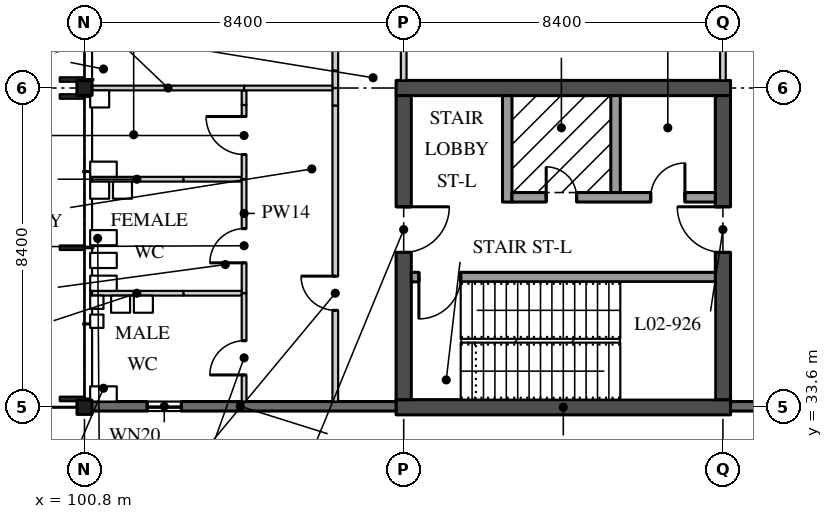
"""IFC4 building model, lengths in metres.
Left out: names, types, materials, properties, quantities, classifications, styles, units other than length and angle.
Written with IfcOpenShell. Run it as: python <this file> out.ifc"""

import sys

from ifc_helpers import new_model, si_unit, direction, frame, frame_2d, origin, origin_2d, place, context, subcontext, project, spatial, rectangle, i_section, extrude, element, fill, save


model = new_model("IFC4")
c1 = context("Model", 3, precision=1e-05, world=origin(), true_north=direction((0.0, 1.0)))
c2 = subcontext(c1, "Body", "Model", "MODEL_VIEW")
j1 = project(units=[si_unit("LENGTHUNIT", "METRE"), si_unit("PLANEANGLEUNIT", "RADIAN")], contexts=[c1])
p1 = place(None, origin())
s1 = spatial("IfcSite", under=j1, at=p1, CompositionType="ELEMENT")
p2 = place(p1, origin())
s2 = spatial("IfcBuilding", under=s1, at=p2, CompositionType="ELEMENT")
p3 = place(p2, frame((0.0, 0.0, 9.9)))
s3 = spatial("IfcBuildingStorey", under=s2, at=p3, CompositionType="ELEMENT", Elevation=9.9)
p4 = place(p3, frame((100.8, 33.6, 0.0), z_axis=(0.0, 0.0, 1.0), x_axis=(1.0, 0.0, 0.0)))
e1 = element("IfcColumn", 1, at=p4, inside=s3, PredefinedType="COLUMN", context=c2, shape_type="SweptSolid", body=[
    extrude(i_section(OverallWidth=0.394, OverallDepth=0.376, WebThickness=0.017, FlangeThickness=0.028, FilletRadius=0.015, at=origin_2d()), origin(), (0.0, 0.0, 1.0), 4.37),
])
p5 = place(p3, frame((100.8, 42.0, 0.0), z_axis=(0.0, 0.0, 1.0), x_axis=(1.0, 0.0, 0.0)))
e2 = element("IfcColumn", 2, at=p5, inside=s3, PredefinedType="COLUMN", context=c2, shape_type="SweptSolid", body=[
    extrude(i_section(OverallWidth=0.399, OverallDepth=0.386, WebThickness=0.021, FlangeThickness=0.033, FilletRadius=0.015, at=origin_2d()), origin(), (0.0, 0.0, 1.0), 4.37),
])
for number, where, z_axis, x_axis in (
    (3, (109.0, 33.6, 0.0), (0.0, 0.0, 1.0), (1.0, 0.0, 0.0)),
    (4, (109.0, 42.0, 0.0), (0.0, 0.0, 1.0), (1.0, 0.0, 0.0)),
):
    element("IfcWall", number, at=place(p3, frame(where, z_axis=z_axis, x_axis=x_axis)), inside=s3, PredefinedType="SHEAR", context=c2, shape_type="SweptSolid", body=[
        extrude(rectangle(XDim=8.8, YDim=0.4, at=frame_2d((4.4, 0.0))), origin(), (0.0, 0.0, 1.0), 4.37),
    ])
p6 = place(p3, frame((109.2, 33.8, 0.0), z_axis=(0.0, 0.0, 1.0), x_axis=(0.0, 1.0, 0.0)))
e5 = element("IfcWall", 5, at=p6, inside=s3, PredefinedType="SHEAR", context=c2, shape_type="SweptSolid", body=[
    extrude(rectangle(XDim=8.0, YDim=0.4, at=frame_2d((4.0, 0.0))), origin(), (0.0, 0.0, 1.0), 4.37),
])
p7 = place(p6, frame((3.875, 0.0, 0.0)))
e6 = element("IfcOpeningElement", 6, at=p7, cuts=e5, PredefinedType="OPENING", context=c2, shape_type="SweptSolid", body=[
    extrude(rectangle(XDim=1.2, YDim=2.1, at=frame_2d((0.6, 1.05))), frame((0.0, 0.21, 0.0), z_axis=(0.0, -1.0, 0.0), x_axis=(1.0, 0.0, 0.0)), (0.0, 0.0, 1.0), 0.42),
])
p8 = place(p3, frame((117.6, 33.8, 0.0), z_axis=(0.0, 0.0, 1.0), x_axis=(0.0, 1.0, 0.0)))
e7 = element("IfcWall", 7, at=p8, inside=s3, PredefinedType="SHEAR", context=c2, shape_type="SweptSolid", body=[
    extrude(rectangle(XDim=8.0, YDim=0.4, at=frame_2d((4.0, 0.0))), origin(), (0.0, 0.0, 1.0), 4.37),
])
p9 = place(p8, frame((3.875, 0.0, 0.0)))
e8 = element("IfcOpeningElement", 8, at=p9, cuts=e7, PredefinedType="OPENING", context=c2, shape_type="SweptSolid", body=[
    extrude(rectangle(XDim=1.2, YDim=2.1, at=frame_2d((0.6, 1.05))), frame((0.0, 0.21, 0.0), z_axis=(0.0, -1.0, 0.0), x_axis=(1.0, 0.0, 0.0)), (0.0, 0.0, 1.0), 0.42),
])
p10 = place(p3, frame((109.4, 37.025, 0.0), z_axis=(0.0, 0.0, 1.0), x_axis=(1.0, 0.0, 0.0)))
e9 = element("IfcWall", 9, at=p10, inside=s3, PredefinedType="SOLIDWALL", context=c2, shape_type="SweptSolid", body=[
    extrude(rectangle(XDim=8.0, YDim=0.25, at=frame_2d((4.0, 0.0))), origin(), (0.0, 0.0, 1.0), 4.37),
])
p11 = place(p10, frame((0.2, 0.0, 0.0)))
e10 = element("IfcOpeningElement", 10, at=p11, cuts=e9, PredefinedType="OPENING", context=c2, shape_type="SweptSolid", body=[
    extrude(rectangle(XDim=1.1, YDim=2.1, at=frame_2d((0.55, 1.05))), frame((0.0, 0.135, 0.0), z_axis=(0.0, -1.0, 0.0), x_axis=(1.0, 0.0, 0.0)), (0.0, 0.0, 1.0), 0.27),
])
p12 = place(p3, frame((111.925, 39.0, 0.0), z_axis=(0.0, 0.0, 1.0), x_axis=(0.0, 1.0, 0.0)))
e11 = element("IfcWall", 11, at=p12, inside=s3, PredefinedType="SOLIDWALL", context=c2, shape_type="SweptSolid", body=[
    extrude(rectangle(XDim=2.8, YDim=0.25, at=frame_2d((1.4, 0.0))), origin(), (0.0, 0.0, 1.0), 4.37),
])
p13 = place(p3, frame((112.05, 39.125, 0.0), z_axis=(0.0, 0.0, 1.0), x_axis=(1.0, 0.0, 0.0)))
e12 = element("IfcWall", 12, at=p13, inside=s3, PredefinedType="SOLIDWALL", context=c2, shape_type="SweptSolid", body=[
    extrude(rectangle(XDim=5.35, YDim=0.25, at=frame_2d((2.675, 0.0))), origin(), (0.0, 0.0, 1.0), 4.37),
])
p14 = place(p13, frame((3.65, 0.0, 0.0)))
e13 = element("IfcOpeningElement", 13, at=p14, cuts=e12, PredefinedType="OPENING", context=c2, shape_type="SweptSolid", body=[
    extrude(rectangle(XDim=0.9, YDim=2.1, at=frame_2d((0.45, 1.05))), frame((0.0, 0.135, 0.0), z_axis=(0.0, -1.0, 0.0), x_axis=(1.0, 0.0, 0.0)), (0.0, 0.0, 1.0), 0.27),
])
p15 = place(p13, frame((0.9, 0.0, 0.0)))
e14 = element("IfcOpeningElement", 14, at=p15, cuts=e12, PredefinedType="OPENING", context=c2, shape_type="SweptSolid", body=[
    extrude(rectangle(XDim=0.8, YDim=2.1, at=frame_2d((0.4, 1.05))), frame((0.0, 0.135, 0.0), z_axis=(0.0, -1.0, 0.0), x_axis=(1.0, 0.0, 0.0)), (0.0, 0.0, 1.0), 0.27),
])
p16 = place(p3, frame((114.775, 39.25, 0.0), z_axis=(0.0, 0.0, 1.0), x_axis=(0.0, 1.0, 0.0)))
e15 = element("IfcWall", 15, at=p16, inside=s3, PredefinedType="SOLIDWALL", context=c2, shape_type="SweptSolid", body=[
    extrude(rectangle(XDim=2.55, YDim=0.25, at=frame_2d((1.275, 0.0))), origin(), (0.0, 0.0, 1.0), 4.37),
])
p17 = place(p3, frame((117.6, 42.2, 0.0), z_axis=(0.0, 0.0, 1.0), x_axis=(0.0, 1.0, 0.0)))
e16 = element("IfcWall", 16, at=p17, inside=s3, PredefinedType="PARTITIONING", context=c2, shape_type="SweptSolid", body=[
    extrude(rectangle(XDim=8.0, YDim=0.15, at=frame_2d((4.0, 0.0))), origin(), (0.0, 0.0, 1.0), 3.746),
])
p18 = place(p17, frame((3.55, 0.0, 0.0)))
e17 = element("IfcOpeningElement", 17, at=p18, cuts=e16, PredefinedType="OPENING", context=c2, shape_type="SweptSolid", body=[
    extrude(rectangle(XDim=0.9, YDim=2.1, at=frame_2d((0.45, 1.05))), frame((0.0, 0.085, 0.0), z_axis=(0.0, -1.0, 0.0), x_axis=(1.0, 0.0, 0.0)), (0.0, 0.0, 1.0), 0.17),
])
p19 = place(p3, frame((109.2, 42.2, 0.0), z_axis=(0.0, 0.0, 1.0), x_axis=(0.0, 1.0, 0.0)))
e18 = element("IfcWall", 18, at=p19, inside=s3, PredefinedType="PARTITIONING", context=c2, shape_type="SweptSolid", body=[
    extrude(rectangle(XDim=8.0, YDim=0.15, at=frame_2d((4.0, 0.0))), origin(), (0.0, 0.0, 1.0), 3.746),
])
p20 = place(p19, frame((3.55, 0.0, 0.0)))
e19 = element("IfcOpeningElement", 19, at=p20, cuts=e18, PredefinedType="OPENING", context=c2, shape_type="SweptSolid", body=[
    extrude(rectangle(XDim=0.9, YDim=2.1, at=frame_2d((0.45, 1.05))), frame((0.0, 0.085, 0.0), z_axis=(0.0, -1.0, 0.0), x_axis=(1.0, 0.0, 0.0)), (0.0, 0.0, 1.0), 0.17),
])
p21 = place(p3, frame((107.4, 33.75, 0.0), z_axis=(0.0, 0.0, 1.0), x_axis=(0.0, 1.0, 0.0)))
e20 = element("IfcWall", 20, at=p21, inside=s3, PredefinedType="PARTITIONING", context=c2, shape_type="SweptSolid", body=[
    extrude(rectangle(XDim=7.79, YDim=0.15, at=frame_2d((3.895, 0.0))), origin(), (0.0, 0.0, 1.0), 4.37),
])
p22 = place(p21, frame((2.4, 0.0, 0.0)))
e21 = element("IfcOpeningElement", 21, at=p22, cuts=e20, PredefinedType="OPENING", context=c2, shape_type="SweptSolid", body=[
    extrude(rectangle(XDim=0.9, YDim=2.1, at=frame_2d((0.45, 1.05))), frame((0.0, 0.085, 0.0), z_axis=(0.0, -1.0, 0.0), x_axis=(1.0, 0.0, 0.0)), (0.0, 0.0, 1.0), 0.17),
])
for number, where, z_axis, x_axis in (
    (22, (107.4, 41.54, 0.0), (0.0, 0.0, 1.0), (0.0, 1.0, 0.0)),
    (23, (107.4, 42.0, 0.0), (0.0, 0.0, 1.0), (0.0, 1.0, 0.0)),
):
    element("IfcWall", number, at=place(p3, frame(where, z_axis=z_axis, x_axis=x_axis)), inside=s3, PredefinedType="PARTITIONING", context=c2, shape_type="SweptSolid", body=[
        extrude(rectangle(XDim=0.46, YDim=0.15, at=frame_2d((0.23, 0.0))), origin(), (0.0, 0.0, 1.0), 3.746),
    ])
p23 = place(p3, frame((107.4, 42.46, 0.0), z_axis=(0.0, 0.0, 1.0), x_axis=(0.0, 1.0, 0.0)))
e24 = element("IfcWall", 24, at=p23, inside=s3, PredefinedType="PARTITIONING", context=c2, shape_type="SweptSolid", body=[
    extrude(rectangle(XDim=7.71, YDim=0.15, at=frame_2d((3.855, 0.0))), origin(), (0.0, 0.0, 1.0), 4.37),
])
p24 = place(p3, frame((100.95, 39.6, 0.0), z_axis=(0.0, 0.0, 1.0), x_axis=(1.0, 0.0, 0.0)))
e25 = element("IfcWall", 25, at=p24, inside=s3, PredefinedType="PARTITIONING", context=c2, shape_type="SweptSolid", body=[
    extrude(rectangle(XDim=2.457, YDim=0.125, at=frame_2d((1.229, 0.0))), origin(), (0.0, 0.0, 1.0), 4.37),
])
p25 = place(p3, frame((103.407, 39.6, 0.0), z_axis=(0.0, 0.0, 1.0), x_axis=(1.0, 0.0, 0.0)))
e26 = element("IfcWall", 26, at=p25, inside=s3, PredefinedType="PARTITIONING", context=c2, shape_type="SweptSolid", body=[
    extrude(rectangle(XDim=1.531, YDim=0.125, at=frame_2d((0.766, 0.0))), origin(), (0.0, 0.0, 1.0), 3.895),
])
p26 = place(p3, frame((105.0, 39.6, 0.0), z_axis=(0.0, 0.0, 1.0), x_axis=(0.0, 1.0, 0.0)))
e27 = element("IfcWall", 27, at=p26, inside=s3, PredefinedType="PARTITIONING", context=c2, shape_type="SweptSolid", body=[
    extrude(rectangle(XDim=1.953, YDim=0.125, at=frame_2d((0.977, 0.0))), origin(), (0.0, 0.0, 1.0), 4.37),
])
p27 = place(p26, frame((0.65, 0.0, 0.0)))
e28 = element("IfcOpeningElement", 28, at=p27, cuts=e27, PredefinedType="OPENING", context=c2, shape_type="SweptSolid", body=[
    extrude(rectangle(XDim=1.0, YDim=2.1, at=frame_2d((0.5, 1.05))), frame((0.0, 0.073, 0.0), z_axis=(0.0, -1.0, 0.0), x_axis=(1.0, 0.0, 0.0)), (0.0, 0.0, 1.0), 0.145),
])
p28 = place(p3, frame((105.0, 41.553, 0.0), z_axis=(0.0, 0.0, 1.0), x_axis=(0.0, 1.0, 0.0)))
e29 = element("IfcWall", 29, at=p28, inside=s3, PredefinedType="PARTITIONING", context=c2, shape_type="SweptSolid", body=[
    extrude(rectangle(XDim=0.385, YDim=0.125, at=frame_2d((0.192, 0.0))), origin(), (0.0, 0.0, 1.0), 3.746),
])
p29 = place(p3, frame((100.999, 42.0, 0.0), z_axis=(0.0, 0.0, 1.0), x_axis=(1.0, 0.0, 0.0)))
e30 = element("IfcWall", 30, at=p29, inside=s3, PredefinedType="PARTITIONING", context=c2, shape_type="SweptSolid", body=[
    extrude(rectangle(XDim=4.001, YDim=0.125, at=frame_2d((2.0, 0.0))), origin(), (0.0, 0.0, 1.0), 3.746),
])
p30 = place(p3, frame((105.0, 36.6, 0.0), z_axis=(0.0, 0.0, 1.0), x_axis=(0.0, 1.0, 0.0)))
e31 = element("IfcWall", 31, at=p30, inside=s3, PredefinedType="PARTITIONING", context=c2, shape_type="SweptSolid", body=[
    extrude(rectangle(XDim=3.0, YDim=0.125, at=frame_2d((1.5, 0.0))), origin(), (0.0, 0.0, 1.0), 4.37),
])
p31 = place(p30, frame((0.8, 0.0, 0.0)))
e32 = element("IfcOpeningElement", 32, at=p31, cuts=e31, PredefinedType="OPENING", context=c2, shape_type="SweptSolid", body=[
    extrude(rectangle(XDim=0.9, YDim=2.1, at=frame_2d((0.45, 1.05))), frame((0.0, 0.073, 0.0), z_axis=(0.0, -1.0, 0.0), x_axis=(1.0, 0.0, 0.0)), (0.0, 0.0, 1.0), 0.145),
])
p32 = place(p3, frame((100.95, 36.6, 0.0), z_axis=(0.0, 0.0, 1.0), x_axis=(1.0, 0.0, 0.0)))
e33 = element("IfcWall", 33, at=p32, inside=s3, PredefinedType="PARTITIONING", context=c2, shape_type="SweptSolid", body=[
    extrude(rectangle(XDim=2.457, YDim=0.125, at=frame_2d((1.229, 0.0))), origin(), (0.0, 0.0, 1.0), 4.37),
])
p33 = place(p3, frame((103.407, 36.6, 0.0), z_axis=(0.0, 0.0, 1.0), x_axis=(1.0, 0.0, 0.0)))
e34 = element("IfcWall", 34, at=p33, inside=s3, PredefinedType="PARTITIONING", context=c2, shape_type="SweptSolid", body=[
    extrude(rectangle(XDim=1.531, YDim=0.125, at=frame_2d((0.766, 0.0))), origin(), (0.0, 0.0, 1.0), 3.895),
])
p34 = place(p3, frame((105.0, 33.75, 0.0), z_axis=(0.0, 0.0, 1.0), x_axis=(0.0, 1.0, 0.0)))
e35 = element("IfcWall", 35, at=p34, inside=s3, PredefinedType="PARTITIONING", context=c2, shape_type="SweptSolid", body=[
    extrude(rectangle(XDim=2.85, YDim=0.125, at=frame_2d((1.425, 0.0))), origin(), (0.0, 0.0, 1.0), 4.37),
])
p35 = place(p34, frame((0.7, 0.0, 0.0)))
e36 = element("IfcOpeningElement", 36, at=p35, cuts=e35, PredefinedType="OPENING", context=c2, shape_type="SweptSolid", body=[
    extrude(rectangle(XDim=0.9, YDim=2.1, at=frame_2d((0.45, 1.05))), frame((0.0, 0.073, 0.0), z_axis=(0.0, -1.0, 0.0), x_axis=(1.0, 0.0, 0.0)), (0.0, 0.0, 1.0), 0.145),
])
p36 = place(p3, frame((105.0, 42.0, 0.0), z_axis=(0.0, 0.0, 1.0), x_axis=(1.0, 0.0, 0.0)))
e37 = element("IfcWall", 37, at=p36, inside=s3, PredefinedType="PARTITIONING", context=c2, shape_type="SweptSolid", body=[
    extrude(rectangle(XDim=2.325, YDim=0.125, at=frame_2d((1.163, 0.0))), origin(), (0.0, 0.0, 1.0), 3.746),
])
p37 = place(p3, frame((100.802, 33.625, 0.0), z_axis=(0.0, 0.0, 1.0), x_axis=(1.0, 0.0, 0.0)))
e38 = element("IfcWall", 38, at=p37, inside=s3, PredefinedType="SOLIDWALL", context=c2, shape_type="SweptSolid", body=[
    extrude(rectangle(XDim=8.198, YDim=0.25, at=frame_2d((4.099, 0.0))), origin(), (0.0, 0.0, 1.0), 3.746),
])
p38 = place(p37, frame((1.649, 0.0, 1.5)))
e39 = element("IfcOpeningElement", 39, at=p38, cuts=e38, PredefinedType="OPENING", context=c2, shape_type="SweptSolid", body=[
    extrude(rectangle(XDim=0.9, YDim=1.2, at=frame_2d((0.45, 0.6))), frame((0.0, 0.135, 0.0), z_axis=(0.0, -1.0, 0.0), x_axis=(1.0, 0.0, 0.0)), (0.0, 0.0, 1.0), 0.27),
])
p39 = place(p3, frame((117.8, 33.625, 0.0), z_axis=(0.0, 0.0, 1.0), x_axis=(1.0, 0.0, 0.0)))
e40 = element("IfcWall", 40, at=p39, inside=s3, PredefinedType="SOLIDWALL", context=c2, shape_type="SweptSolid", body=[
    extrude(rectangle(XDim=8.194, YDim=0.25, at=frame_2d((4.097, 0.0))), origin(), (0.0, 0.0, 1.0), 3.746),
])
p40 = place(p39, frame((5.2, 0.0, 0.9)))
e41 = element("IfcOpeningElement", 41, at=p40, cuts=e40, PredefinedType="OPENING", context=c2, shape_type="SweptSolid", body=[
    extrude(rectangle(XDim=1.8, YDim=2.1, at=frame_2d((0.9, 1.05))), frame((0.0, 0.135, 0.0), z_axis=(0.0, -1.0, 0.0), x_axis=(1.0, 0.0, 0.0)), (0.0, 0.0, 1.0), 0.27),
])
p41 = place(p14, origin())
e42 = element("IfcDoor", 42, at=p41, inside=s3, OperationType="SINGLE_SWING_LEFT", PredefinedType="DOOR", context=c2, shape_type="SweptSolid", body=[
    extrude(rectangle(XDim=0.9, YDim=2.1, at=frame_2d((0.45, 1.05))), frame((0.0, 0.035, 0.0), z_axis=(0.0, -1.0, 0.0), x_axis=(1.0, 0.0, 0.0)), (0.0, 0.0, 1.0), 0.07),
])
fill(e13, e42)
p42 = place(p7, frame((1.2, 0.0, 0.0), z_axis=(0.0, 0.0, 1.0), x_axis=(-1.0, 0.0, 0.0)))
e43 = element("IfcDoor", 43, at=p42, inside=s3, OperationType="SINGLE_SWING_RIGHT", PredefinedType="DOOR", context=c2, shape_type="SweptSolid", body=[
    extrude(rectangle(XDim=1.2, YDim=2.1, at=frame_2d((0.6, 1.05))), frame((0.0, 0.035, 0.0), z_axis=(0.0, -1.0, 0.0), x_axis=(1.0, 0.0, 0.0)), (0.0, 0.0, 1.0), 0.07),
])
fill(e6, e43)
p43 = place(p9, origin())
e44 = element("IfcDoor", 44, at=p43, inside=s3, OperationType="SINGLE_SWING_LEFT", PredefinedType="DOOR", context=c2, shape_type="SweptSolid", body=[
    extrude(rectangle(XDim=1.2, YDim=2.1, at=frame_2d((0.6, 1.05))), frame((0.0, 0.035, 0.0), z_axis=(0.0, -1.0, 0.0), x_axis=(1.0, 0.0, 0.0)), (0.0, 0.0, 1.0), 0.07),
])
fill(e8, e44)
p44 = place(p15, origin())
e45 = element("IfcDoor", 45, at=p44, inside=s3, OperationType="SINGLE_SWING_RIGHT", PredefinedType="DOOR", context=c2, shape_type="SweptSolid", body=[
    extrude(rectangle(XDim=0.8, YDim=2.1, at=frame_2d((0.4, 1.05))), frame((0.0, 0.035, 0.0), z_axis=(0.0, -1.0, 0.0), x_axis=(1.0, 0.0, 0.0)), (0.0, 0.0, 1.0), 0.07),
])
fill(e14, e45)
p45 = place(p11, frame((1.1, 0.0, 0.0), z_axis=(0.0, 0.0, 1.0), x_axis=(-1.0, 0.0, 0.0)))
e46 = element("IfcDoor", 46, at=p45, inside=s3, OperationType="SINGLE_SWING_LEFT", PredefinedType="DOOR", context=c2, shape_type="SweptSolid", body=[
    extrude(rectangle(XDim=1.1, YDim=2.1, at=frame_2d((0.55, 1.05))), frame((0.0, 0.035, 0.0), z_axis=(0.0, -1.0, 0.0), x_axis=(1.0, 0.0, 0.0)), (0.0, 0.0, 1.0), 0.07),
])
fill(e10, e46)
p46 = place(p27, origin())
e47 = element("IfcDoor", 47, at=p46, inside=s3, OperationType="SINGLE_SWING_LEFT", PredefinedType="DOOR", context=c2, shape_type="SweptSolid", body=[
    extrude(rectangle(XDim=1.0, YDim=2.1, at=frame_2d((0.5, 1.05))), frame((0.0, 0.02, 0.0), z_axis=(0.0, -1.0, 0.0), x_axis=(1.0, 0.0, 0.0)), (0.0, 0.0, 1.0), 0.04),
])
fill(e28, e47)
p47 = place(p31, origin())
e48 = element("IfcDoor", 48, at=p47, inside=s3, OperationType="SINGLE_SWING_RIGHT", PredefinedType="DOOR", context=c2, shape_type="SweptSolid", body=[
    extrude(rectangle(XDim=0.9, YDim=2.1, at=frame_2d((0.45, 1.05))), frame((0.0, 0.02, 0.0), z_axis=(0.0, -1.0, 0.0), x_axis=(1.0, 0.0, 0.0)), (0.0, 0.0, 1.0), 0.04),
])
fill(e32, e48)
p48 = place(p22, origin())
e49 = element("IfcDoor", 49, at=p48, inside=s3, OperationType="SINGLE_SWING_LEFT", PredefinedType="DOOR", context=c2, shape_type="SweptSolid", body=[
    extrude(rectangle(XDim=0.9, YDim=2.1, at=frame_2d((0.45, 1.05))), frame((0.0, 0.025, 0.0), z_axis=(0.0, -1.0, 0.0), x_axis=(1.0, 0.0, 0.0)), (0.0, 0.0, 1.0), 0.05),
])
fill(e21, e49)
p49 = place(p35, origin())
e50 = element("IfcDoor", 50, at=p49, inside=s3, OperationType="SINGLE_SWING_RIGHT", PredefinedType="DOOR", context=c2, shape_type="SweptSolid", body=[
    extrude(rectangle(XDim=0.9, YDim=2.1, at=frame_2d((0.45, 1.05))), frame((0.0, 0.02, 0.0), z_axis=(0.0, -1.0, 0.0), x_axis=(1.0, 0.0, 0.0)), (0.0, 0.0, 1.0), 0.04),
])
fill(e36, e50)
p50 = place(p38, origin())
e51 = element("IfcWindow", 51, at=p50, inside=s3, PartitioningType="SINGLE_PANEL", PredefinedType="WINDOW", context=c2, shape_type="SweptSolid", body=[
    extrude(rectangle(XDim=0.9, YDim=1.2, at=frame_2d((0.45, 0.6))), frame((0.0, 0.04, 0.0), z_axis=(0.0, -1.0, 0.0), x_axis=(1.0, 0.0, 0.0)), (0.0, 0.0, 1.0), 0.08),
])
fill(e39, e51)
save(model, sys.argv[1])
